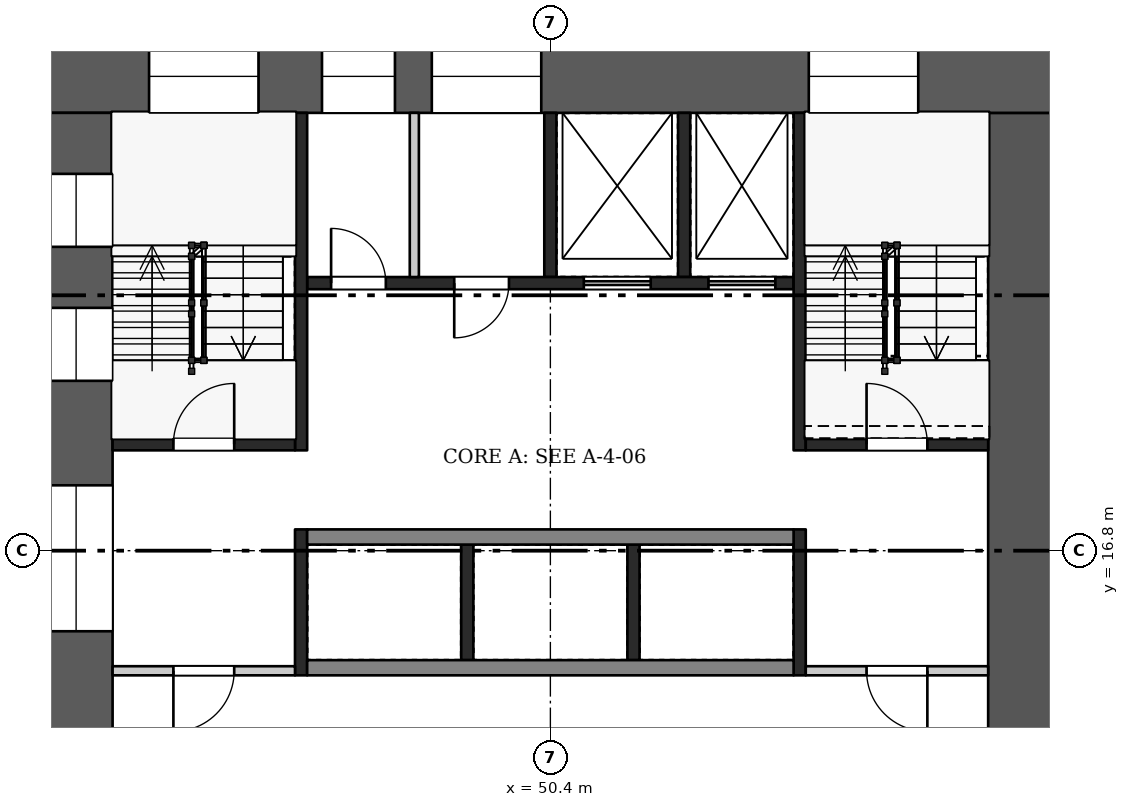
"""IFC4 building model, lengths in metres.
Left out: names, types, materials, properties, quantities, classifications, styles, units other than length and angle.
Written with IfcOpenShell. Run it as: python <this file> out.ifc"""

import sys

from ifc_helpers import new_model, si_unit, direction, frame, frame_2d, origin, place, context, subcontext, project, spatial, rectangle, extrude, element, fill, save


model = new_model("IFC4")
c1 = context("Model", 3, precision=1e-05, world=origin(), true_north=direction((0.0, 1.0)))
c2 = subcontext(c1, "Body", "Model", "MODEL_VIEW")
j1 = project(units=[si_unit("LENGTHUNIT", "METRE"), si_unit("PLANEANGLEUNIT", "RADIAN")], contexts=[c1])
p1 = place(None, origin())
s1 = spatial("IfcSite", under=j1, at=p1, CompositionType="ELEMENT")
p2 = place(p1, origin())
s2 = spatial("IfcBuilding", under=s1, at=p2, CompositionType="ELEMENT")
p3 = place(p2, frame((0.0, 0.0, 9.0)))
s3 = spatial("IfcBuildingStorey", under=s2, at=p3, CompositionType="ELEMENT", Elevation=9.0)
p4 = place(p3, frame((42.0, 24.6, 0.0), z_axis=(0.0, 0.0, 1.0), x_axis=(1.0, 0.0, 0.0)))
e1 = element("IfcWall", 1, at=p4, inside=s3, PredefinedType="SHEAR", context=c2, shape_type="SweptSolid", body=[
    extrude(rectangle(XDim=16.8, YDim=1.2, at=frame_2d((8.4, 0.0))), origin(), (0.0, 0.0, 1.0), 4.98),
])
p5 = place(p4, frame((1.8, 0.0, 0.5)))
e2 = element("IfcOpeningElement", 2, at=p5, cuts=e1, PredefinedType="OPENING", context=c2, shape_type="SweptSolid", body=[
    extrude(rectangle(XDim=1.8, YDim=2.4, at=frame_2d((0.9, 1.2))), frame((0.0, 0.61, 0.0), z_axis=(0.0, -1.0, 0.0), x_axis=(1.0, 0.0, 0.0)), (0.0, 0.0, 1.0), 1.22),
])
p6 = place(p4, frame((4.644, 0.0, 1.6)))
e3 = element("IfcOpeningElement", 3, at=p6, cuts=e1, PredefinedType="OPENING", context=c2, shape_type="SweptSolid", body=[
    extrude(rectangle(XDim=1.2, YDim=1.2, at=frame_2d((0.6, 0.6))), frame((0.0, 0.61, 0.0), z_axis=(0.0, -1.0, 0.0), x_axis=(1.0, 0.0, 0.0)), (0.0, 0.0, 1.0), 1.22),
])
p7 = place(p4, frame((6.45, 0.0, 1.6)))
e4 = element("IfcOpeningElement", 4, at=p7, cuts=e1, PredefinedType="OPENING", context=c2, shape_type="SweptSolid", body=[
    extrude(rectangle(XDim=1.8, YDim=1.2, at=frame_2d((0.9, 0.6))), frame((0.0, 0.61, 0.0), z_axis=(0.0, -1.0, 0.0), x_axis=(1.0, 0.0, 0.0)), (0.0, 0.0, 1.0), 1.22),
])
p8 = place(p4, frame((12.65, 0.0, 0.5)))
e5 = element("IfcOpeningElement", 5, at=p8, cuts=e1, PredefinedType="OPENING", context=c2, shape_type="SweptSolid", body=[
    extrude(rectangle(XDim=1.8, YDim=2.4, at=frame_2d((0.9, 1.2))), frame((0.0, 0.61, 0.0), z_axis=(0.0, -1.0, 0.0), x_axis=(1.0, 0.0, 0.0)), (0.0, 0.0, 1.0), 1.22),
])
p9 = place(p3, frame((42.6, 9.6, 0.0), z_axis=(0.0, 0.0, 1.0), x_axis=(0.0, 1.0, 0.0)))
e6 = element("IfcWall", 6, at=p9, inside=s3, PredefinedType="SHEAR", context=c2, shape_type="SweptSolid", body=[
    extrude(rectangle(XDim=14.4, YDim=1.2, at=frame_2d((7.2, 0.0))), origin(), (0.0, 0.0, 1.0), 4.98),
])
p10 = place(p9, frame((1.105, 0.0, 0.6)))
e7 = element("IfcOpeningElement", 7, at=p10, cuts=e6, PredefinedType="OPENING", context=c2, shape_type="SweptSolid", body=[
    extrude(rectangle(XDim=3.0, YDim=2.1, at=frame_2d((1.5, 1.05))), frame((0.0, 0.61, 0.0), z_axis=(0.0, -1.0, 0.0), x_axis=(1.0, 0.0, 0.0)), (0.0, 0.0, 1.0), 1.22),
])
p11 = place(p9, frame((5.875, 0.0, 0.6)))
e8 = element("IfcOpeningElement", 8, at=p11, cuts=e6, PredefinedType="OPENING", context=c2, shape_type="SweptSolid", body=[
    extrude(rectangle(XDim=2.4, YDim=2.1, at=frame_2d((1.2, 1.05))), frame((0.0, 0.61, 0.0), z_axis=(0.0, -1.0, 0.0), x_axis=(1.0, 0.0, 0.0)), (0.0, 0.0, 1.0), 1.22),
])
p12 = place(p9, frame((9.993, 0.0, 0.5)))
e9 = element("IfcOpeningElement", 9, at=p12, cuts=e6, PredefinedType="OPENING", context=c2, shape_type="SweptSolid", body=[
    extrude(rectangle(XDim=1.2, YDim=2.4, at=frame_2d((0.6, 1.2))), frame((0.0, 0.61, 0.0), z_axis=(0.0, -1.0, 0.0), x_axis=(1.0, 0.0, 0.0)), (0.0, 0.0, 1.0), 1.22),
])
p13 = place(p9, frame((12.197, 0.0, 0.5)))
e10 = element("IfcOpeningElement", 10, at=p13, cuts=e6, PredefinedType="OPENING", context=c2, shape_type="SweptSolid", body=[
    extrude(rectangle(XDim=1.2, YDim=2.4, at=frame_2d((0.6, 1.2))), frame((0.0, 0.61, 0.0), z_axis=(0.0, -1.0, 0.0), x_axis=(1.0, 0.0, 0.0)), (0.0, 0.0, 1.0), 1.22),
])
p14 = place(p3, frame((58.2, 9.6, 0.0), z_axis=(0.0, 0.0, 1.0), x_axis=(0.0, 1.0, 0.0)))
e11 = element("IfcWall", 11, at=p14, inside=s3, PredefinedType="SHEAR", context=c2, shape_type="SweptSolid", body=[
    extrude(rectangle(XDim=14.4, YDim=1.2, at=frame_2d((7.2, 0.0))), origin(), (0.0, 0.0, 1.0), 4.98),
])
p15 = place(p14, frame((2.1, 0.0, 0.0)))
e12 = element("IfcOpeningElement", 12, at=p15, cuts=e11, PredefinedType="OPENING", context=c2, shape_type="SweptSolid", body=[
    extrude(rectangle(XDim=1.8, YDim=2.1, at=frame_2d((0.9, 1.05))), frame((0.0, 0.61, 0.0), z_axis=(0.0, -1.0, 0.0), x_axis=(1.0, 0.0, 0.0)), (0.0, 0.0, 1.0), 1.22),
])
for number, where, z_axis, x_axis in (
    (13, (49.033, 15.0, 0.0), (0.0, 0.0, 1.0), (0.0, 1.0, 0.0)),
    (14, (51.767, 15.0, 0.0), (0.0, 0.0, 1.0), (0.0, 1.0, 0.0)),
):
    element("IfcWall", number, at=place(p3, frame(where, z_axis=z_axis, x_axis=x_axis)), inside=s3, PredefinedType="SHEAR", context=c2, shape_type="SweptSolid", body=[
        extrude(rectangle(XDim=1.9, YDim=0.2, at=frame_2d((0.95, 0.0))), origin(), (0.0, 0.0, 1.0), 4.98),
    ])
for number, where, z_axis, x_axis in (
    (15, (46.4, 14.875, 0.0), (0.0, 0.0, 1.0), (1.0, 0.0, 0.0)),
    (16, (46.4, 17.025, 0.0), (0.0, 0.0, 1.0), (1.0, 0.0, 0.0)),
):
    element("IfcWall", number, at=place(p3, frame(where, z_axis=z_axis, x_axis=x_axis)), inside=s3, PredefinedType="SHEAR", context=c2, shape_type="SweptSolid", body=[
        extrude(rectangle(XDim=8.0, YDim=0.25, at=frame_2d((4.0, 0.0))), origin(), (0.0, 0.0, 1.0), 4.98),
    ])
for number, where, z_axis, x_axis in (
    (17, (50.4, 21.3, 0.0), (0.0, 0.0, 1.0), (0.0, 1.0, 0.0)),
    (18, (52.6, 21.3, 0.0), (0.0, 0.0, 1.0), (0.0, 1.0, 0.0)),
):
    element("IfcWall", number, at=place(p3, frame(where, z_axis=z_axis, x_axis=x_axis)), inside=s3, PredefinedType="SHEAR", context=c2, shape_type="SweptSolid", body=[
        extrude(rectangle(XDim=2.7, YDim=0.2, at=frame_2d((1.35, 0.0))), origin(), (0.0, 0.0, 1.0), 4.98),
    ])
p16 = place(p3, frame((48.163, 21.3, 0.0), z_axis=(0.0, 0.0, 1.0), x_axis=(0.0, 1.0, 0.0)))
e19 = element("IfcWall", 19, at=p16, inside=s3, PredefinedType="PARTITIONING", context=c2, shape_type="SweptSolid", body=[
    extrude(rectangle(XDim=2.7, YDim=0.15, at=frame_2d((1.35, 0.0))), origin(), (0.0, 0.0, 1.0), 4.98),
])
p17 = place(p3, frame((46.4, 21.2, 0.0), z_axis=(0.0, 0.0, 1.0), x_axis=(1.0, 0.0, 0.0)))
e20 = element("IfcWall", 20, at=p17, inside=s3, PredefinedType="SHEAR", context=c2, shape_type="SweptSolid", body=[
    extrude(rectangle(XDim=8.0, YDim=0.2, at=frame_2d((4.0, 0.0))), origin(), (0.0, 0.0, 1.0), 4.98),
])
p18 = place(p17, frame((0.394, 0.0, 0.0)))
e21 = element("IfcOpeningElement", 21, at=p18, cuts=e20, PredefinedType="OPENING", context=c2, shape_type="SweptSolid", body=[
    extrude(rectangle(XDim=0.9, YDim=2.1, at=frame_2d((0.45, 1.05))), frame((0.0, 0.11, 0.0), z_axis=(0.0, -1.0, 0.0), x_axis=(1.0, 0.0, 0.0)), (0.0, 0.0, 1.0), 0.22),
])
p19 = place(p17, frame((2.419, 0.0, 0.0)))
e22 = element("IfcOpeningElement", 22, at=p19, cuts=e20, PredefinedType="OPENING", context=c2, shape_type="SweptSolid", body=[
    extrude(rectangle(XDim=0.9, YDim=2.1, at=frame_2d((0.45, 1.05))), frame((0.0, 0.11, 0.0), z_axis=(0.0, -1.0, 0.0), x_axis=(1.0, 0.0, 0.0)), (0.0, 0.0, 1.0), 0.22),
])
p20 = place(p17, frame((4.55, 0.0, 0.0)))
e23 = element("IfcOpeningElement", 23, at=p20, cuts=e20, PredefinedType="OPENING", context=c2, shape_type="SweptSolid", body=[
    extrude(rectangle(XDim=1.1, YDim=2.1, at=frame_2d((0.55, 1.05))), frame((0.0, 0.11, 0.0), z_axis=(0.0, -1.0, 0.0), x_axis=(1.0, 0.0, 0.0)), (0.0, 0.0, 1.0), 0.22),
])
p21 = place(p17, frame((6.6, 0.0, 0.0)))
e24 = element("IfcOpeningElement", 24, at=p21, cuts=e20, PredefinedType="OPENING", context=c2, shape_type="SweptSolid", body=[
    extrude(rectangle(XDim=1.1, YDim=2.1, at=frame_2d((0.55, 1.05))), frame((0.0, 0.11, 0.0), z_axis=(0.0, -1.0, 0.0), x_axis=(1.0, 0.0, 0.0)), (0.0, 0.0, 1.0), 0.22),
])
p22 = place(p3, frame((46.3, 14.75, 0.0), z_axis=(0.0, 0.0, 1.0), x_axis=(0.0, 1.0, 0.0)))
e25 = element("IfcWall", 25, at=p22, inside=s3, PredefinedType="SHEAR", context=c2, shape_type="SweptSolid", body=[
    extrude(rectangle(XDim=2.4, YDim=0.2, at=frame_2d((1.2, 0.0))), origin(), (0.0, 0.0, 1.0), 4.98),
])
p23 = place(p3, frame((46.3, 18.45, 0.0), z_axis=(0.0, 0.0, 1.0), x_axis=(0.0, 1.0, 0.0)))
e26 = element("IfcWall", 26, at=p23, inside=s3, PredefinedType="SHEAR", context=c2, shape_type="SweptSolid", body=[
    extrude(rectangle(XDim=5.55, YDim=0.2, at=frame_2d((2.775, 0.0))), origin(), (0.0, 0.0, 1.0), 4.98),
])
p24 = place(p3, frame((43.2, 14.825, 0.0), z_axis=(0.0, 0.0, 1.0), x_axis=(1.0, 0.0, 0.0)))
e27 = element("IfcWall", 27, at=p24, inside=s3, PredefinedType="PARTITIONING", context=c2, shape_type="SweptSolid", body=[
    extrude(rectangle(XDim=3.0, YDim=0.15, at=frame_2d((1.5, 0.0))), origin(), (0.0, 0.0, 1.0), 4.98),
])
p25 = place(p24, frame((1.0, 0.0, 0.0)))
e28 = element("IfcOpeningElement", 28, at=p25, cuts=e27, PredefinedType="OPENING", context=c2, shape_type="SweptSolid", body=[
    extrude(rectangle(XDim=1.0, YDim=2.1, at=frame_2d((0.5, 1.05))), frame((0.0, 0.085, 0.0), z_axis=(0.0, -1.0, 0.0), x_axis=(1.0, 0.0, 0.0)), (0.0, 0.0, 1.0), 0.17),
])
p26 = place(p3, frame((43.2, 18.55, 0.0), z_axis=(0.0, 0.0, 1.0), x_axis=(1.0, 0.0, 0.0)))
e29 = element("IfcWall", 29, at=p26, inside=s3, PredefinedType="SHEAR", context=c2, shape_type="SweptSolid", body=[
    extrude(rectangle(XDim=3.0, YDim=0.2, at=frame_2d((1.5, 0.0))), origin(), (0.0, 0.0, 1.0), 4.98),
])
p27 = place(p26, frame((1.0, 0.0, 0.0)))
e30 = element("IfcOpeningElement", 30, at=p27, cuts=e29, PredefinedType="OPENING", context=c2, shape_type="SweptSolid", body=[
    extrude(rectangle(XDim=1.0, YDim=2.1, at=frame_2d((0.5, 1.05))), frame((0.0, 0.11, 0.0), z_axis=(0.0, -1.0, 0.0), x_axis=(1.0, 0.0, 0.0)), (0.0, 0.0, 1.0), 0.22),
])
p28 = place(p3, frame((54.5, 14.75, 0.0), z_axis=(0.0, 0.0, 1.0), x_axis=(0.0, 1.0, 0.0)))
e31 = element("IfcWall", 31, at=p28, inside=s3, PredefinedType="SHEAR", context=c2, shape_type="SweptSolid", body=[
    extrude(rectangle(XDim=2.4, YDim=0.2, at=frame_2d((1.2, 0.0))), origin(), (0.0, 0.0, 1.0), 4.98),
])
p29 = place(p3, frame((54.5, 18.45, 0.0), z_axis=(0.0, 0.0, 1.0), x_axis=(0.0, 1.0, 0.0)))
e32 = element("IfcWall", 32, at=p29, inside=s3, PredefinedType="SHEAR", context=c2, shape_type="SweptSolid", body=[
    extrude(rectangle(XDim=5.55, YDim=0.2, at=frame_2d((2.775, 0.0))), origin(), (0.0, 0.0, 1.0), 4.98),
])
p30 = place(p3, frame((54.6, 14.825, 0.0), z_axis=(0.0, 0.0, 1.0), x_axis=(1.0, 0.0, 0.0)))
e33 = element("IfcWall", 33, at=p30, inside=s3, PredefinedType="PARTITIONING", context=c2, shape_type="SweptSolid", body=[
    extrude(rectangle(XDim=3.0, YDim=0.15, at=frame_2d((1.5, 0.0))), origin(), (0.0, 0.0, 1.0), 4.98),
])
p31 = place(p30, frame((1.0, 0.0, 0.0)))
e34 = element("IfcOpeningElement", 34, at=p31, cuts=e33, PredefinedType="OPENING", context=c2, shape_type="SweptSolid", body=[
    extrude(rectangle(XDim=1.0, YDim=2.1, at=frame_2d((0.5, 1.05))), frame((0.0, 0.085, 0.0), z_axis=(0.0, -1.0, 0.0), x_axis=(1.0, 0.0, 0.0)), (0.0, 0.0, 1.0), 0.17),
])
p32 = place(p3, frame((54.6, 18.55, 0.0), z_axis=(0.0, 0.0, 1.0), x_axis=(1.0, 0.0, 0.0)))
e35 = element("IfcWall", 35, at=p32, inside=s3, PredefinedType="SHEAR", context=c2, shape_type="SweptSolid", body=[
    extrude(rectangle(XDim=3.0, YDim=0.2, at=frame_2d((1.5, 0.0))), origin(), (0.0, 0.0, 1.0), 4.98),
])
p33 = place(p32, frame((1.0, 0.0, 0.0)))
e36 = element("IfcOpeningElement", 36, at=p33, cuts=e35, PredefinedType="OPENING", context=c2, shape_type="SweptSolid", body=[
    extrude(rectangle(XDim=1.0, YDim=2.1, at=frame_2d((0.5, 1.05))), frame((0.0, 0.11, 0.0), z_axis=(0.0, -1.0, 0.0), x_axis=(1.0, 0.0, 0.0)), (0.0, 0.0, 1.0), 0.22),
])
p34 = place(p18, origin())
e37 = element("IfcDoor", 37, at=p34, inside=s3, OperationType="SINGLE_SWING_LEFT", PredefinedType="DOOR", context=c2, shape_type="SweptSolid", body=[
    extrude(rectangle(XDim=0.9, YDim=2.1, at=frame_2d((0.45, 1.05))), frame((0.0, 0.025, 0.0), z_axis=(0.0, -1.0, 0.0), x_axis=(1.0, 0.0, 0.0)), (0.0, 0.0, 1.0), 0.05),
])
fill(e21, e37)
p35 = place(p19, frame((0.9, 0.0, 0.0), z_axis=(0.0, 0.0, 1.0), x_axis=(-1.0, 0.0, 0.0)))
e38 = element("IfcDoor", 38, at=p35, inside=s3, OperationType="SINGLE_SWING_RIGHT", PredefinedType="DOOR", context=c2, shape_type="SweptSolid", body=[
    extrude(rectangle(XDim=0.9, YDim=2.1, at=frame_2d((0.45, 1.05))), frame((0.0, 0.025, 0.0), z_axis=(0.0, -1.0, 0.0), x_axis=(1.0, 0.0, 0.0)), (0.0, 0.0, 1.0), 0.05),
])
fill(e22, e38)
p36 = place(p20, origin())
e39 = element("IfcDoor", 39, at=p36, inside=s3, OperationType="DOUBLE_DOOR_SLIDING", PredefinedType="DOOR", context=c2, shape_type="SweptSolid", body=[
    extrude(rectangle(XDim=1.1, YDim=2.1, at=frame_2d((0.55, 1.05))), frame((0.0, 0.025, 0.0), z_axis=(0.0, -1.0, 0.0), x_axis=(1.0, 0.0, 0.0)), (0.0, 0.0, 1.0), 0.05),
])
fill(e23, e39)
p37 = place(p21, origin())
e40 = element("IfcDoor", 40, at=p37, inside=s3, OperationType="DOUBLE_DOOR_SLIDING", PredefinedType="DOOR", context=c2, shape_type="SweptSolid", body=[
    extrude(rectangle(XDim=1.1, YDim=2.1, at=frame_2d((0.55, 1.05))), frame((0.0, 0.025, 0.0), z_axis=(0.0, -1.0, 0.0), x_axis=(1.0, 0.0, 0.0)), (0.0, 0.0, 1.0), 0.05),
])
fill(e24, e40)
p38 = place(p25, frame((1.0, 0.0, 0.0), z_axis=(0.0, 0.0, 1.0), x_axis=(-1.0, 0.0, 0.0)))
e41 = element("IfcDoor", 41, at=p38, inside=s3, OperationType="SINGLE_SWING_RIGHT", PredefinedType="DOOR", context=c2, shape_type="SweptSolid", body=[
    extrude(rectangle(XDim=1.0, YDim=2.1, at=frame_2d((0.5, 1.05))), frame((0.0, 0.025, 0.0), z_axis=(0.0, -1.0, 0.0), x_axis=(1.0, 0.0, 0.0)), (0.0, 0.0, 1.0), 0.05),
])
fill(e28, e41)
p39 = place(p27, origin())
e42 = element("IfcDoor", 42, at=p39, inside=s3, OperationType="SINGLE_SWING_RIGHT", PredefinedType="DOOR", context=c2, shape_type="SweptSolid", body=[
    extrude(rectangle(XDim=1.0, YDim=2.1, at=frame_2d((0.5, 1.05))), frame((0.0, 0.025, 0.0), z_axis=(0.0, -1.0, 0.0), x_axis=(1.0, 0.0, 0.0)), (0.0, 0.0, 1.0), 0.05),
])
fill(e30, e42)
p40 = place(p31, frame((1.0, 0.0, 0.0), z_axis=(0.0, 0.0, 1.0), x_axis=(-1.0, 0.0, 0.0)))
e43 = element("IfcDoor", 43, at=p40, inside=s3, OperationType="SINGLE_SWING_LEFT", PredefinedType="DOOR", context=c2, shape_type="SweptSolid", body=[
    extrude(rectangle(XDim=1.0, YDim=2.1, at=frame_2d((0.5, 1.05))), frame((0.0, 0.025, 0.0), z_axis=(0.0, -1.0, 0.0), x_axis=(1.0, 0.0, 0.0)), (0.0, 0.0, 1.0), 0.05),
])
fill(e34, e43)
p41 = place(p33, origin())
e44 = element("IfcDoor", 44, at=p41, inside=s3, OperationType="SINGLE_SWING_LEFT", PredefinedType="DOOR", context=c2, shape_type="SweptSolid", body=[
    extrude(rectangle(XDim=1.0, YDim=2.1, at=frame_2d((0.5, 1.05))), frame((0.0, 0.025, 0.0), z_axis=(0.0, -1.0, 0.0), x_axis=(1.0, 0.0, 0.0)), (0.0, 0.0, 1.0), 0.05),
])
fill(e36, e44)
p42 = place(p5, origin())
e45 = element("IfcWindow", 45, at=p42, inside=s3, PartitioningType="SINGLE_PANEL", PredefinedType="WINDOW", context=c2, shape_type="SweptSolid", body=[
    extrude(rectangle(XDim=1.8, YDim=2.4, at=frame_2d((0.9, 1.2))), frame((0.0, 0.03, 0.0), z_axis=(0.0, -1.0, 0.0), x_axis=(1.0, 0.0, 0.0)), (0.0, 0.0, 1.0), 0.06),
])
fill(e2, e45)
p43 = place(p6, origin())
e46 = element("IfcWindow", 46, at=p43, inside=s3, PartitioningType="SINGLE_PANEL", PredefinedType="WINDOW", context=c2, shape_type="SweptSolid", body=[
    extrude(rectangle(XDim=1.2, YDim=1.2, at=frame_2d((0.6, 0.6))), frame((0.0, 0.03, 0.0), z_axis=(0.0, -1.0, 0.0), x_axis=(1.0, 0.0, 0.0)), (0.0, 0.0, 1.0), 0.06),
])
fill(e3, e46)
p44 = place(p7, origin())
e47 = element("IfcWindow", 47, at=p44, inside=s3, PartitioningType="SINGLE_PANEL", PredefinedType="WINDOW", context=c2, shape_type="SweptSolid", body=[
    extrude(rectangle(XDim=1.8, YDim=1.2, at=frame_2d((0.9, 0.6))), frame((0.0, 0.03, 0.0), z_axis=(0.0, -1.0, 0.0), x_axis=(1.0, 0.0, 0.0)), (0.0, 0.0, 1.0), 0.06),
])
fill(e4, e47)
p45 = place(p8, origin())
e48 = element("IfcWindow", 48, at=p45, inside=s3, PartitioningType="SINGLE_PANEL", PredefinedType="WINDOW", context=c2, shape_type="SweptSolid", body=[
    extrude(rectangle(XDim=1.8, YDim=2.4, at=frame_2d((0.9, 1.2))), frame((0.0, 0.03, 0.0), z_axis=(0.0, -1.0, 0.0), x_axis=(1.0, 0.0, 0.0)), (0.0, 0.0, 1.0), 0.06),
])
fill(e5, e48)
p46 = place(p11, origin())
e49 = element("IfcWindow", 49, at=p46, inside=s3, PartitioningType="SINGLE_PANEL", PredefinedType="WINDOW", context=c2, shape_type="SweptSolid", body=[
    extrude(rectangle(XDim=2.4, YDim=2.1, at=frame_2d((1.2, 1.05))), frame((0.0, 0.03, 0.0), z_axis=(0.0, -1.0, 0.0), x_axis=(1.0, 0.0, 0.0)), (0.0, 0.0, 1.0), 0.06),
])
fill(e8, e49)
p47 = place(p12, origin())
e50 = element("IfcWindow", 50, at=p47, inside=s3, PartitioningType="SINGLE_PANEL", PredefinedType="WINDOW", context=c2, shape_type="SweptSolid", body=[
    extrude(rectangle(XDim=1.2, YDim=2.4, at=frame_2d((0.6, 1.2))), frame((0.0, 0.03, 0.0), z_axis=(0.0, -1.0, 0.0), x_axis=(1.0, 0.0, 0.0)), (0.0, 0.0, 1.0), 0.06),
])
fill(e9, e50)
p48 = place(p13, origin())
e51 = element("IfcWindow", 51, at=p48, inside=s3, PartitioningType="SINGLE_PANEL", PredefinedType="WINDOW", context=c2, shape_type="SweptSolid", body=[
    extrude(rectangle(XDim=1.2, YDim=2.4, at=frame_2d((0.6, 1.2))), frame((0.0, 0.03, 0.0), z_axis=(0.0, -1.0, 0.0), x_axis=(1.0, 0.0, 0.0)), (0.0, 0.0, 1.0), 0.06),
])
fill(e10, e51)
save(model, sys.argv[1])
